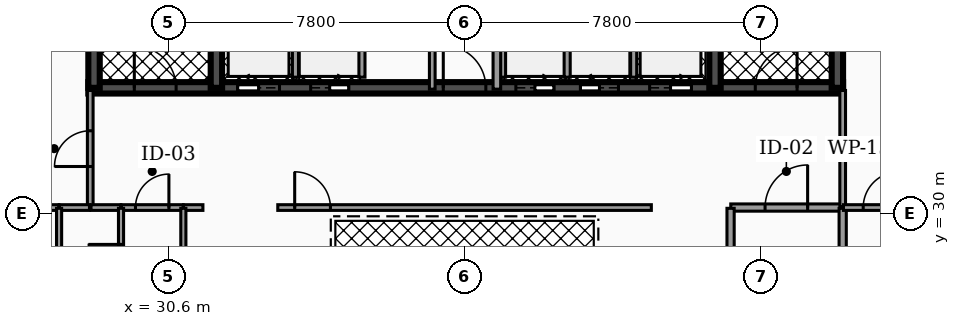
"""IFC4 building model, lengths in metres.
Left out: names, types, materials, properties, quantities, classifications, styles, units other than length and angle.
Written with IfcOpenShell. Run it as: python <this file> out.ifc"""

import sys

from ifc_helpers import new_model, si_unit, direction, frame, frame_2d, origin, place, context, subcontext, project, spatial, rectangle, extrude, element, fill, save


model = new_model("IFC4")
c1 = context("Model", 3, precision=1e-05, world=origin(), true_north=direction((0.0, 1.0)))
c2 = subcontext(c1, "Body", "Model", "MODEL_VIEW")
j1 = project(units=[si_unit("LENGTHUNIT", "METRE"), si_unit("PLANEANGLEUNIT", "RADIAN")], contexts=[c1])
p1 = place(None, origin())
s1 = spatial("IfcSite", under=j1, at=p1, CompositionType="ELEMENT")
p2 = place(p1, origin())
s2 = spatial("IfcBuilding", under=s1, at=p2, CompositionType="ELEMENT")
p3 = place(p2, frame((0.0, 0.0, 215.56)))
s3 = spatial("IfcBuildingStorey", under=s2, at=p3, CompositionType="ELEMENT", Elevation=215.56)
p4 = place(p3, frame((28.5, 33.3, 0.0), z_axis=(0.0, 0.0, 1.0), x_axis=(1.0, 0.0, 0.0)))
e1 = element("IfcWall", 1, at=p4, inside=s3, PredefinedType="SHEAR", context=c2, shape_type="SweptSolid", body=[
    extrude(rectangle(XDim=19.86, YDim=0.3, at=frame_2d((9.93, 0.0))), origin(), (0.0, 0.0, 1.0), 3.18),
])
p5 = place(p4, frame((3.93, 0.0, 0.0)))
e2 = element("IfcOpeningElement", 2, at=p5, cuts=e1, PredefinedType="OPENING", context=c2, shape_type="SweptSolid", body=[
    extrude(rectangle(XDim=1.1, YDim=2.15, at=frame_2d((0.55, 1.075))), frame((0.0, 0.16, 0.0), z_axis=(0.0, -1.0, 0.0), x_axis=(1.0, 0.0, 0.0)), (0.0, 0.0, 1.0), 0.32),
])
p6 = place(p4, frame((14.77, 0.0, 0.0)))
e3 = element("IfcOpeningElement", 3, at=p6, cuts=e1, PredefinedType="OPENING", context=c2, shape_type="SweptSolid", body=[
    extrude(rectangle(XDim=1.1, YDim=2.15, at=frame_2d((0.55, 1.075))), frame((0.0, 0.16, 0.0), z_axis=(0.0, -1.0, 0.0), x_axis=(1.0, 0.0, 0.0)), (0.0, 0.0, 1.0), 0.32),
])
p7 = place(p4, frame((11.25, 0.0, 0.0)))
e4 = element("IfcOpeningElement", 4, at=p7, cuts=e1, PredefinedType="OPENING", context=c2, shape_type="SweptSolid", body=[
    extrude(rectangle(XDim=1.0, YDim=2.1, at=frame_2d((0.5, 1.05))), frame((0.0, 0.16, 0.0), z_axis=(0.0, -1.0, 0.0), x_axis=(1.0, 0.0, 0.0)), (0.0, 0.0, 1.0), 0.32),
])
p8 = place(p4, frame((12.95, 0.0, 0.0)))
e5 = element("IfcOpeningElement", 5, at=p8, cuts=e1, PredefinedType="OPENING", context=c2, shape_type="SweptSolid", body=[
    extrude(rectangle(XDim=1.0, YDim=2.1, at=frame_2d((0.5, 1.05))), frame((0.0, 0.16, 0.0), z_axis=(0.0, -1.0, 0.0), x_axis=(1.0, 0.0, 0.0)), (0.0, 0.0, 1.0), 0.32),
])
p9 = place(p4, frame((5.85, 0.0, 0.0)))
e6 = element("IfcOpeningElement", 6, at=p9, cuts=e1, PredefinedType="OPENING", context=c2, shape_type="SweptSolid", body=[
    extrude(rectangle(XDim=1.0, YDim=2.1, at=frame_2d((0.5, 1.05))), frame((0.0, 0.16, 0.0), z_axis=(0.0, -1.0, 0.0), x_axis=(1.0, 0.0, 0.0)), (0.0, 0.0, 1.0), 0.32),
])
p10 = place(p4, frame((1.21, 0.0, 0.0)))
e7 = element("IfcOpeningElement", 7, at=p10, cuts=e1, PredefinedType="OPENING", context=c2, shape_type="SweptSolid", body=[
    extrude(rectangle(XDim=1.1, YDim=2.2, at=frame_2d((0.55, 1.1))), frame((0.0, 0.16, 0.0), z_axis=(0.0, -1.0, 0.0), x_axis=(1.0, 0.0, 0.0)), (0.0, 0.0, 1.0), 0.32),
])
p11 = place(p4, frame((9.34, 0.0, 0.0)))
e8 = element("IfcOpeningElement", 8, at=p11, cuts=e1, PredefinedType="OPENING", context=c2, shape_type="SweptSolid", body=[
    extrude(rectangle(XDim=1.12, YDim=2.05, at=frame_2d((0.56, 1.025))), frame((0.0, 0.16, 0.0), z_axis=(0.0, -1.0, 0.0), x_axis=(1.0, 0.0, 0.0)), (0.0, 0.0, 1.0), 0.32),
])
p12 = place(p4, frame((17.55, 0.0, 0.0)))
e9 = element("IfcOpeningElement", 9, at=p12, cuts=e1, PredefinedType="OPENING", context=c2, shape_type="SweptSolid", body=[
    extrude(rectangle(XDim=1.1, YDim=2.2, at=frame_2d((0.55, 1.1))), frame((0.0, 0.16, 0.0), z_axis=(0.0, -1.0, 0.0), x_axis=(1.0, 0.0, 0.0)), (0.0, 0.0, 1.0), 0.32),
])
for number, where, z_axis, x_axis in (
    (10, (28.65, 33.3, 0.0), (0.0, 0.0, 1.0), (0.0, 1.0, 0.0)),
    (11, (31.87, 33.3, 0.0), (0.0, 0.0, 1.0), (0.0, 1.0, 0.0)),
    (12, (44.99, 33.3, 0.0), (0.0, 0.0, 1.0), (0.0, 1.0, 0.0)),
    (13, (48.21, 33.3, 0.0), (0.0, 0.0, 1.0), (0.0, 1.0, 0.0)),
):
    element("IfcWall", number, at=place(p3, frame(where, z_axis=z_axis, x_axis=x_axis)), inside=s3, PredefinedType="SHEAR", context=c2, shape_type="SweptSolid", body=[
        extrude(rectangle(XDim=10.1, YDim=0.3, at=frame_2d((5.05, 0.0))), origin(), (0.0, 0.0, 1.0), 3.18),
    ])
for number, where, z_axis, x_axis in (
    (14, (33.95, 33.58, 0.0), (0.0, 0.0, 1.0), (0.0, 1.0, 0.0)),
    (15, (42.85, 33.58, 0.0), (0.0, 0.0, 1.0), (0.0, 1.0, 0.0)),
):
    element("IfcWall", number, at=place(p3, frame(where, z_axis=z_axis, x_axis=x_axis)), inside=s3, PredefinedType="SOLIDWALL", context=c2, shape_type="SweptSolid", body=[
        extrude(rectangle(XDim=2.45, YDim=0.16, at=frame_2d((1.225, 0.0))), origin(), (0.0, 0.0, 1.0), 3.18),
    ])
for number, where, z_axis, x_axis in (
    (16, (39.4, 33.58, 0.0), (0.0, 0.0, 1.0), (0.0, 1.0, 0.0)),
    (17, (41.1, 33.58, 0.0), (0.0, 0.0, 1.0), (0.0, 1.0, 0.0)),
    (18, (35.7, 33.58, 0.0), (0.0, 0.0, 1.0), (0.0, 1.0, 0.0)),
):
    element("IfcWall", number, at=place(p3, frame(where, z_axis=z_axis, x_axis=x_axis)), inside=s3, PredefinedType="SOLIDWALL", context=c2, shape_type="SweptSolid", body=[
        extrude(rectangle(XDim=2.25, YDim=0.16, at=frame_2d((1.125, 0.0))), origin(), (0.0, 0.0, 1.0), 3.18),
    ])
p13 = place(p3, frame((37.55, 33.265, 0.0), z_axis=(0.0, 0.0, 1.0), x_axis=(0.0, 1.0, 0.0)))
e19 = element("IfcWall", 19, at=p13, inside=s3, PredefinedType="PARTITIONING", context=c2, shape_type="SweptSolid", body=[
    extrude(rectangle(XDim=3.615, YDim=0.15, at=frame_2d((1.808, 0.0))), origin(), (0.0, 0.0, 1.0), 2.235),
])
p14 = place(p13, frame((1.337, 0.0, 0.0)))
e20 = element("IfcOpeningElement", 20, at=p14, cuts=e19, PredefinedType="OPENING", context=c2, shape_type="SweptSolid", body=[
    extrude(rectangle(XDim=0.94, YDim=2.05, at=frame_2d((0.47, 1.025))), frame((0.0, 0.085, 0.0), z_axis=(0.0, -1.0, 0.0), x_axis=(1.0, 0.0, 0.0)), (0.0, 0.0, 1.0), 0.17),
])
p15 = place(p3, frame((39.25, 33.265, 0.0), z_axis=(0.0, 0.0, 1.0), x_axis=(0.0, 1.0, 0.0)))
e21 = element("IfcWall", 21, at=p15, inside=s3, PredefinedType="PARTITIONING", context=c2, shape_type="SweptSolid", body=[
    extrude(rectangle(XDim=3.615, YDim=0.2, at=frame_2d((1.808, 0.0))), origin(), (0.0, 0.0, 1.0), 2.235),
])
p16 = place(p3, frame((45.405, 30.15, 0.0), z_axis=(0.0, 0.0, 1.0), x_axis=(1.0, 0.0, 0.0)))
e22 = element("IfcWall", 22, at=p16, inside=s3, PredefinedType="PARTITIONING", context=c2, shape_type="SweptSolid", body=[
    extrude(rectangle(XDim=2.925, YDim=0.19, at=frame_2d((1.462, 0.0))), origin(), (0.0, 0.0, 1.0), 2.235),
])
p17 = place(p16, frame((0.903, 0.0, 0.0)))
e23 = element("IfcOpeningElement", 23, at=p17, cuts=e22, PredefinedType="OPENING", context=c2, shape_type="SweptSolid", body=[
    extrude(rectangle(XDim=1.12, YDim=2.05, at=frame_2d((0.56, 1.025))), frame((0.0, 0.105, 0.0), z_axis=(0.0, -1.0, 0.0), x_axis=(1.0, 0.0, 0.0)), (0.0, 0.0, 1.0), 0.21),
])
p18 = place(p3, frame((28.55, 30.17, 0.0), z_axis=(0.0, 0.0, 1.0), x_axis=(0.0, 1.0, 0.0)))
e24 = element("IfcWall", 24, at=p18, inside=s3, PredefinedType="PARTITIONING", context=c2, shape_type="SweptSolid", body=[
    extrude(rectangle(XDim=3.06, YDim=0.15, at=frame_2d((1.53, 0.0))), origin(), (0.0, 0.0, 1.0), 2.235),
])
p19 = place(p18, frame((1.06, 0.0, 0.0)))
e25 = element("IfcOpeningElement", 25, at=p19, cuts=e24, PredefinedType="OPENING", context=c2, shape_type="SweptSolid", body=[
    extrude(rectangle(XDim=0.94, YDim=2.05, at=frame_2d((0.47, 1.025))), frame((0.0, 0.085, 0.0), z_axis=(0.0, -1.0, 0.0), x_axis=(1.0, 0.0, 0.0)), (0.0, 0.0, 1.0), 0.17),
])
p20 = place(p3, frame((48.35, 30.17, 0.0), z_axis=(0.0, 0.0, 1.0), x_axis=(0.0, 1.0, 0.0)))
e26 = element("IfcWall", 26, at=p20, inside=s3, PredefinedType="PARTITIONING", context=c2, shape_type="SweptSolid", body=[
    extrude(rectangle(XDim=3.06, YDim=0.15, at=frame_2d((1.53, 0.0))), origin(), (0.0, 0.0, 1.0), 2.235),
])
p21 = place(p3, frame((29.365, 30.15, 0.0), z_axis=(0.0, 0.0, 1.0), x_axis=(1.0, 0.0, 0.0)))
e27 = element("IfcWall", 27, at=p21, inside=s3, PredefinedType="PARTITIONING", context=c2, shape_type="SweptSolid", body=[
    extrude(rectangle(XDim=1.63, YDim=0.15, at=frame_2d((0.815, 0.0))), origin(), (0.0, 0.0, 1.0), 2.235),
])
p22 = place(p21, frame((0.375, 0.0, 0.0)))
e28 = element("IfcOpeningElement", 28, at=p22, cuts=e27, PredefinedType="OPENING", context=c2, shape_type="SweptSolid", body=[
    extrude(rectangle(XDim=0.88, YDim=2.05, at=frame_2d((0.44, 1.025))), frame((0.0, 0.085, 0.0), z_axis=(0.0, -1.0, 0.0), x_axis=(1.0, 0.0, 0.0)), (0.0, 0.0, 1.0), 0.17),
])
p23 = place(p3, frame((28.57, 30.15, 0.0), z_axis=(0.0, 0.0, 1.0), x_axis=(1.0, 0.0, 0.0)))
e29 = element("IfcWall", 29, at=p23, inside=s3, PredefinedType="PARTITIONING", context=c2, shape_type="SweptSolid", body=[
    extrude(rectangle(XDim=0.785, YDim=0.15, at=frame_2d((0.393, 0.0))), origin(), (0.0, 0.0, 1.0), 2.235),
])
p24 = place(p3, frame((33.485, 30.15, 0.0), z_axis=(0.0, 0.0, 1.0), x_axis=(1.0, 0.0, 0.0)))
e30 = element("IfcWall", 30, at=p24, inside=s3, PredefinedType="PARTITIONING", context=c2, shape_type="SweptSolid", body=[
    extrude(rectangle(XDim=9.83, YDim=0.15, at=frame_2d((4.915, 0.0))), origin(), (0.0, 0.0, 1.0), 2.235),
])
p25 = place(p24, frame((0.445, 0.0, 0.0)))
e31 = element("IfcOpeningElement", 31, at=p25, cuts=e30, PredefinedType="OPENING", context=c2, shape_type="SweptSolid", body=[
    extrude(rectangle(XDim=0.94, YDim=2.05, at=frame_2d((0.47, 1.025))), frame((0.0, 0.085, 0.0), z_axis=(0.0, -1.0, 0.0), x_axis=(1.0, 0.0, 0.0)), (0.0, 0.0, 1.0), 0.17),
])
p26 = place(p3, frame((31.005, 30.15, 0.0), z_axis=(0.0, 0.0, 1.0), x_axis=(1.0, 0.0, 0.0)))
e32 = element("IfcWall", 32, at=p26, inside=s3, PredefinedType="PARTITIONING", context=c2, shape_type="SweptSolid", body=[
    extrude(rectangle(XDim=0.51, YDim=0.15, at=frame_2d((0.255, 0.0))), origin(), (0.0, 0.0, 1.0), 2.235),
])
for number, where, z_axis, x_axis in (
    (33, (45.4, 27.37, 0.0), (0.0, 0.0, 1.0), (0.0, 1.0, 0.0)),
    (34, (48.35, 27.37, 0.0), (0.0, 0.0, 1.0), (0.0, 1.0, 0.0)),
):
    element("IfcWall", number, at=place(p3, frame(where, z_axis=z_axis, x_axis=x_axis)), inside=s3, PredefinedType="PARTITIONING", context=c2, shape_type="SweptSolid", body=[
        extrude(rectangle(XDim=2.76, YDim=0.19, at=frame_2d((1.38, 0.0))), origin(), (0.0, 0.0, 1.0), 2.235),
    ])
p27 = place(p3, frame((26.55, 30.15, 0.0), z_axis=(0.0, 0.0, 1.0), x_axis=(1.0, 0.0, 0.0)))
e35 = element("IfcWall", 35, at=p27, inside=s3, PredefinedType="PARTITIONING", context=c2, shape_type="SweptSolid", body=[
    extrude(rectangle(XDim=1.175, YDim=0.15, at=frame_2d((0.587, 0.0))), origin(), (0.0, 0.0, 1.0), 2.235),
])
p28 = place(p3, frame((27.735, 30.15, 0.0), z_axis=(0.0, 0.0, 1.0), x_axis=(1.0, 0.0, 0.0)))
e36 = element("IfcWall", 36, at=p28, inside=s3, PredefinedType="PARTITIONING", context=c2, shape_type="SweptSolid", body=[
    extrude(rectangle(XDim=0.795, YDim=0.15, at=frame_2d((0.397, 0.0))), origin(), (0.0, 0.0, 1.0), 2.235),
])
p29 = place(p3, frame((48.37, 30.15, 0.0), z_axis=(0.0, 0.0, 1.0), x_axis=(1.0, 0.0, 0.0)))
e37 = element("IfcWall", 37, at=p29, inside=s3, PredefinedType="PARTITIONING", context=c2, shape_type="SweptSolid", body=[
    extrude(rectangle(XDim=1.98, YDim=0.15, at=frame_2d((0.99, 0.0))), origin(), (0.0, 0.0, 1.0), 2.235),
])
p30 = place(p29, frame((0.52, 0.0, 0.0)))
e38 = element("IfcOpeningElement", 38, at=p30, cuts=e37, PredefinedType="OPENING", context=c2, shape_type="SweptSolid", body=[
    extrude(rectangle(XDim=0.94, YDim=2.05, at=frame_2d((0.47, 1.025))), frame((0.0, 0.085, 0.0), z_axis=(0.0, -1.0, 0.0), x_axis=(1.0, 0.0, 0.0)), (0.0, 0.0, 1.0), 0.17),
])
p31 = place(p3, frame((29.36, 27.37, 0.0), z_axis=(0.0, 0.0, 1.0), x_axis=(0.0, 1.0, 0.0)))
e39 = element("IfcWall", 39, at=p31, inside=s3, PredefinedType="PARTITIONING", context=c2, shape_type="SweptSolid", body=[
    extrude(rectangle(XDim=2.76, YDim=0.135, at=frame_2d((1.38, 0.0))), origin(), (0.0, 0.0, 1.0), 2.235),
])
p32 = place(p31, frame((0.95, 0.0, 0.0)))
e40 = element("IfcOpeningElement", 40, at=p32, cuts=e39, PredefinedType="OPENING", context=c2, shape_type="SweptSolid", body=[
    extrude(rectangle(XDim=0.86, YDim=2.05, at=frame_2d((0.43, 1.025))), frame((0.0, 0.077, 0.0), z_axis=(0.0, -1.0, 0.0), x_axis=(1.0, 0.0, 0.0)), (0.0, 0.0, 1.0), 0.155),
])
for number, where, z_axis, x_axis in (
    (41, (31.0, 27.37, 0.0), (0.0, 0.0, 1.0), (0.0, 1.0, 0.0)),
    (42, (27.73, 27.37, 0.0), (0.0, 0.0, 1.0), (0.0, 1.0, 0.0)),
):
    element("IfcWall", number, at=place(p3, frame(where, z_axis=z_axis, x_axis=x_axis)), inside=s3, PredefinedType="PARTITIONING", context=c2, shape_type="SweptSolid", body=[
        extrude(rectangle(XDim=2.76, YDim=0.135, at=frame_2d((1.38, 0.0))), origin(), (0.0, 0.0, 1.0), 2.235),
    ])
p33 = place(p5, origin())
e43 = element("IfcDoor", 43, at=p33, inside=s3, OperationType="SLIDING_TO_LEFT", PredefinedType="DOOR", context=c2, shape_type="SweptSolid", body=[
    extrude(rectangle(XDim=1.1, YDim=2.15, at=frame_2d((0.55, 1.075))), frame((0.0, 0.025, 0.0), z_axis=(0.0, -1.0, 0.0), x_axis=(1.0, 0.0, 0.0)), (0.0, 0.0, 1.0), 0.05),
])
fill(e2, e43)
p34 = place(p6, origin())
e44 = element("IfcDoor", 44, at=p34, inside=s3, OperationType="SLIDING_TO_RIGHT", PredefinedType="DOOR", context=c2, shape_type="SweptSolid", body=[
    extrude(rectangle(XDim=1.1, YDim=2.15, at=frame_2d((0.55, 1.075))), frame((0.0, 0.025, 0.0), z_axis=(0.0, -1.0, 0.0), x_axis=(1.0, 0.0, 0.0)), (0.0, 0.0, 1.0), 0.05),
])
fill(e3, e44)
p35 = place(p7, origin())
e45 = element("IfcDoor", 45, at=p35, inside=s3, OperationType="SLIDING_TO_RIGHT", PredefinedType="DOOR", context=c2, shape_type="SweptSolid", body=[
    extrude(rectangle(XDim=1.0, YDim=2.1, at=frame_2d((0.5, 1.05))), frame((0.0, 0.025, 0.0), z_axis=(0.0, -1.0, 0.0), x_axis=(1.0, 0.0, 0.0)), (0.0, 0.0, 1.0), 0.05),
])
fill(e4, e45)
p36 = place(p8, origin())
e46 = element("IfcDoor", 46, at=p36, inside=s3, OperationType="SLIDING_TO_LEFT", PredefinedType="DOOR", context=c2, shape_type="SweptSolid", body=[
    extrude(rectangle(XDim=1.0, YDim=2.1, at=frame_2d((0.5, 1.05))), frame((0.0, 0.025, 0.0), z_axis=(0.0, -1.0, 0.0), x_axis=(1.0, 0.0, 0.0)), (0.0, 0.0, 1.0), 0.05),
])
fill(e5, e46)
p37 = place(p9, origin())
e47 = element("IfcDoor", 47, at=p37, inside=s3, OperationType="SLIDING_TO_RIGHT", PredefinedType="DOOR", context=c2, shape_type="SweptSolid", body=[
    extrude(rectangle(XDim=1.0, YDim=2.1, at=frame_2d((0.5, 1.05))), frame((0.0, 0.025, 0.0), z_axis=(0.0, -1.0, 0.0), x_axis=(1.0, 0.0, 0.0)), (0.0, 0.0, 1.0), 0.05),
])
fill(e6, e47)
p38 = place(p10, origin())
e48 = element("IfcDoor", 48, at=p38, inside=s3, OperationType="SINGLE_SWING_LEFT", PredefinedType="DOOR", context=c2, shape_type="SweptSolid", body=[
    extrude(rectangle(XDim=1.1, YDim=2.2, at=frame_2d((0.55, 1.1))), frame((0.0, 0.025, 0.0), z_axis=(0.0, -1.0, 0.0), x_axis=(1.0, 0.0, 0.0)), (0.0, 0.0, 1.0), 0.05),
])
fill(e7, e48)
p39 = place(p11, origin())
e49 = element("IfcDoor", 49, at=p39, inside=s3, OperationType="SINGLE_SWING_LEFT", PredefinedType="DOOR", context=c2, shape_type="SweptSolid", body=[
    extrude(rectangle(XDim=1.12, YDim=2.05, at=frame_2d((0.56, 1.025))), frame((0.0, 0.025, 0.0), z_axis=(0.0, -1.0, 0.0), x_axis=(1.0, 0.0, 0.0)), (0.0, 0.0, 1.0), 0.05),
])
fill(e8, e49)
p40 = place(p12, origin())
e50 = element("IfcDoor", 50, at=p40, inside=s3, OperationType="SINGLE_SWING_RIGHT", PredefinedType="DOOR", context=c2, shape_type="SweptSolid", body=[
    extrude(rectangle(XDim=1.1, YDim=2.2, at=frame_2d((0.55, 1.1))), frame((0.0, 0.025, 0.0), z_axis=(0.0, -1.0, 0.0), x_axis=(1.0, 0.0, 0.0)), (0.0, 0.0, 1.0), 0.05),
])
fill(e9, e50)
p41 = place(p17, origin())
e51 = element("IfcDoor", 51, at=p41, inside=s3, OperationType="SINGLE_SWING_RIGHT", PredefinedType="DOOR", context=c2, shape_type="SweptSolid", body=[
    extrude(rectangle(XDim=1.12, YDim=2.05, at=frame_2d((0.56, 1.025))), frame((0.0, 0.025, 0.0), z_axis=(0.0, -1.0, 0.0), x_axis=(1.0, 0.0, 0.0)), (0.0, 0.0, 1.0), 0.05),
])
fill(e23, e51)
p42 = place(p19, origin())
e52 = element("IfcDoor", 52, at=p42, inside=s3, OperationType="SINGLE_SWING_LEFT", PredefinedType="DOOR", context=c2, shape_type="SweptSolid", body=[
    extrude(rectangle(XDim=0.94, YDim=2.05, at=frame_2d((0.47, 1.025))), frame((0.0, 0.025, 0.0), z_axis=(0.0, -1.0, 0.0), x_axis=(1.0, 0.0, 0.0)), (0.0, 0.0, 1.0), 0.05),
])
fill(e25, e52)
p43 = place(p22, origin())
e53 = element("IfcDoor", 53, at=p43, inside=s3, OperationType="SINGLE_SWING_RIGHT", PredefinedType="DOOR", context=c2, shape_type="SweptSolid", body=[
    extrude(rectangle(XDim=0.88, YDim=2.05, at=frame_2d((0.44, 1.025))), frame((0.0, 0.025, 0.0), z_axis=(0.0, -1.0, 0.0), x_axis=(1.0, 0.0, 0.0)), (0.0, 0.0, 1.0), 0.05),
])
fill(e28, e53)
p44 = place(p25, origin())
e54 = element("IfcDoor", 54, at=p44, inside=s3, OperationType="SINGLE_SWING_LEFT", PredefinedType="DOOR", context=c2, shape_type="SweptSolid", body=[
    extrude(rectangle(XDim=0.94, YDim=2.05, at=frame_2d((0.47, 1.025))), frame((0.0, 0.025, 0.0), z_axis=(0.0, -1.0, 0.0), x_axis=(1.0, 0.0, 0.0)), (0.0, 0.0, 1.0), 0.05),
])
fill(e31, e54)
p45 = place(p30, origin())
e55 = element("IfcDoor", 55, at=p45, inside=s3, OperationType="SINGLE_SWING_RIGHT", PredefinedType="DOOR", context=c2, shape_type="SweptSolid", body=[
    extrude(rectangle(XDim=0.94, YDim=2.05, at=frame_2d((0.47, 1.025))), frame((0.0, 0.025, 0.0), z_axis=(0.0, -1.0, 0.0), x_axis=(1.0, 0.0, 0.0)), (0.0, 0.0, 1.0), 0.05),
])
fill(e38, e55)
p46 = place(p32, origin())
e56 = element("IfcDoor", 56, at=p46, inside=s3, OperationType="SINGLE_SWING_RIGHT", PredefinedType="DOOR", context=c2, shape_type="SweptSolid", body=[
    extrude(rectangle(XDim=0.86, YDim=2.05, at=frame_2d((0.43, 1.025))), frame((0.0, 0.025, 0.0), z_axis=(0.0, -1.0, 0.0), x_axis=(1.0, 0.0, 0.0)), (0.0, 0.0, 1.0), 0.05),
])
fill(e40, e56)
save(model, sys.argv[1])
